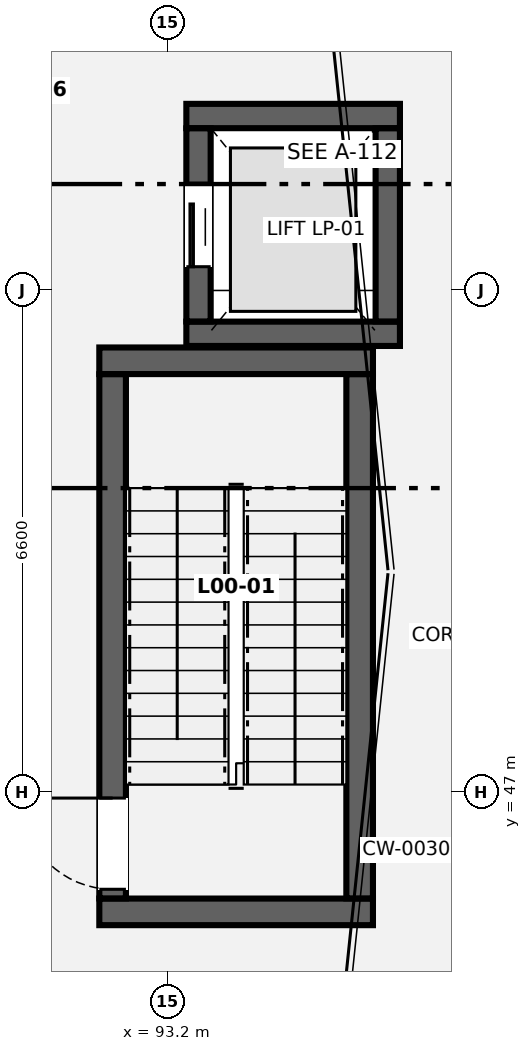
"""IFC4 building model, lengths in metres.
Left out: names, types, materials, properties, quantities, classifications, styles, units other than length and angle.
Written with IfcOpenShell. Run it as: python <this file> out.ifc"""

import sys

from ifc_helpers import new_model, si_unit, direction, frame, frame_2d, origin, place, context, subcontext, project, spatial, rectangle, extrude, element, fill, save


model = new_model("IFC4")
c1 = context("Model", 3, precision=1e-05, world=origin(), true_north=direction((0.0, 1.0)))
c2 = subcontext(c1, "Body", "Model", "MODEL_VIEW")
j1 = project(units=[si_unit("LENGTHUNIT", "METRE"), si_unit("PLANEANGLEUNIT", "RADIAN")], contexts=[c1])
p1 = place(None, origin())
s1 = spatial("IfcSite", under=j1, at=p1, CompositionType="ELEMENT")
p2 = place(p1, origin())
s2 = spatial("IfcBuilding", under=s1, at=p2, CompositionType="ELEMENT")
p3 = place(p2, origin())
s3 = spatial("IfcBuildingStorey", under=s2, at=p3, CompositionType="ELEMENT", Elevation=0.0)
for number, where, z_axis, x_axis in (
    (1, (92.3, 45.425, 0.0), (0.0, 0.0, 1.0), (1.0, 0.0, 0.0)),
    (2, (92.3, 52.675, 0.0), (0.0, 0.0, 1.0), (1.0, 0.0, 0.0)),
):
    element("IfcWall", number, at=place(p3, frame(where, z_axis=z_axis, x_axis=x_axis)), inside=s3, PredefinedType="SHEAR", context=c2, shape_type="SweptSolid", body=[
        extrude(rectangle(XDim=3.6, YDim=0.35, at=frame_2d((1.8, 0.0))), origin(), (0.0, 0.0, 1.0), 4.7),
    ])
p4 = place(p3, frame((92.475, 45.602, 0.0), z_axis=(0.0, 0.0, 1.0), x_axis=(0.0, 1.0, 0.0)))
e3 = element("IfcWall", 3, at=p4, inside=s3, PredefinedType="SHEAR", context=c2, shape_type="SweptSolid", body=[
    extrude(rectangle(XDim=6.896, YDim=0.35, at=frame_2d((3.448, 0.0))), origin(), (0.0, 0.0, 1.0), 4.7),
])
p5 = place(p4, frame((0.12, 0.0, 0.0)))
e4 = element("IfcOpeningElement", 4, at=p5, cuts=e3, PredefinedType="OPENING", context=c2, shape_type="SweptSolid", body=[
    extrude(rectangle(XDim=1.2, YDim=2.15, at=frame_2d((0.6, 1.075))), frame((0.0, 0.185, 0.0), z_axis=(0.0, -1.0, 0.0), x_axis=(1.0, 0.0, 0.0)), (0.0, 0.0, 1.0), 0.37),
])
p6 = place(p3, frame((95.725, 45.602, 0.0), z_axis=(0.0, 0.0, 1.0), x_axis=(0.0, 1.0, 0.0)))
e5 = element("IfcWall", 5, at=p6, inside=s3, PredefinedType="SHEAR", context=c2, shape_type="SweptSolid", body=[
    extrude(rectangle(XDim=6.896, YDim=0.35, at=frame_2d((3.448, 0.0))), origin(), (0.0, 0.0, 1.0), 4.7),
])
for number, where, z_axis, x_axis in (
    (6, (93.445, 53.03, 0.0), (0.0, 0.0, 1.0), (1.0, 0.0, 0.0)),
    (7, (93.445, 55.895, 0.0), (0.0, 0.0, 1.0), (1.0, 0.0, 0.0)),
):
    element("IfcWall", number, at=place(p3, frame(where, z_axis=z_axis, x_axis=x_axis)), inside=s3, PredefinedType="SHEAR", context=c2, shape_type="SweptSolid", body=[
        extrude(rectangle(XDim=2.81, YDim=0.32, at=frame_2d((1.405, 0.0))), origin(), (0.0, 0.0, 1.0), 4.7),
    ])
p7 = place(p3, frame((93.605, 53.192, 0.0), z_axis=(0.0, 0.0, 1.0), x_axis=(0.0, 1.0, 0.0)))
e8 = element("IfcWall", 8, at=p7, inside=s3, PredefinedType="SHEAR", context=c2, shape_type="SweptSolid", body=[
    extrude(rectangle(XDim=2.541, YDim=0.32, at=frame_2d((1.271, 0.0))), origin(), (0.0, 0.0, 1.0), 4.7),
])
p8 = place(p7, frame((0.72, 0.0, 0.0)))
e9 = element("IfcOpeningElement", 9, at=p8, cuts=e8, PredefinedType="OPENING", context=c2, shape_type="SweptSolid", body=[
    extrude(rectangle(XDim=1.1, YDim=2.15, at=frame_2d((0.55, 1.075))), frame((0.0, 0.17, 0.0), z_axis=(0.0, -1.0, 0.0), x_axis=(1.0, 0.0, 0.0)), (0.0, 0.0, 1.0), 0.34),
])
p9 = place(p3, frame((96.095, 53.192, 0.0), z_axis=(0.0, 0.0, 1.0), x_axis=(0.0, 1.0, 0.0)))
e10 = element("IfcWall", 10, at=p9, inside=s3, PredefinedType="SHEAR", context=c2, shape_type="SweptSolid", body=[
    extrude(rectangle(XDim=2.541, YDim=0.32, at=frame_2d((1.271, 0.0))), origin(), (0.0, 0.0, 1.0), 4.7),
])
p10 = place(p5, origin())
e11 = element("IfcDoor", 11, at=p10, inside=s3, OperationType="SINGLE_SWING_RIGHT", PredefinedType="DOOR", context=c2, shape_type="SweptSolid", body=[
    extrude(rectangle(XDim=1.2, YDim=2.15, at=frame_2d((0.6, 1.075))), frame((0.0, 0.025, 0.0), z_axis=(0.0, -1.0, 0.0), x_axis=(1.0, 0.0, 0.0)), (0.0, 0.0, 1.0), 0.05),
])
fill(e4, e11)
p11 = place(p8, origin())
e12 = element("IfcDoor", 12, at=p11, inside=s3, OperationType="SLIDING_TO_LEFT", PredefinedType="DOOR", context=c2, shape_type="SweptSolid", body=[
    extrude(rectangle(XDim=1.1, YDim=2.15, at=frame_2d((0.55, 1.075))), frame((0.0, 0.025, 0.0), z_axis=(0.0, -1.0, 0.0), x_axis=(1.0, 0.0, 0.0)), (0.0, 0.0, 1.0), 0.05),
])
fill(e9, e12)
save(model, sys.argv[1])
